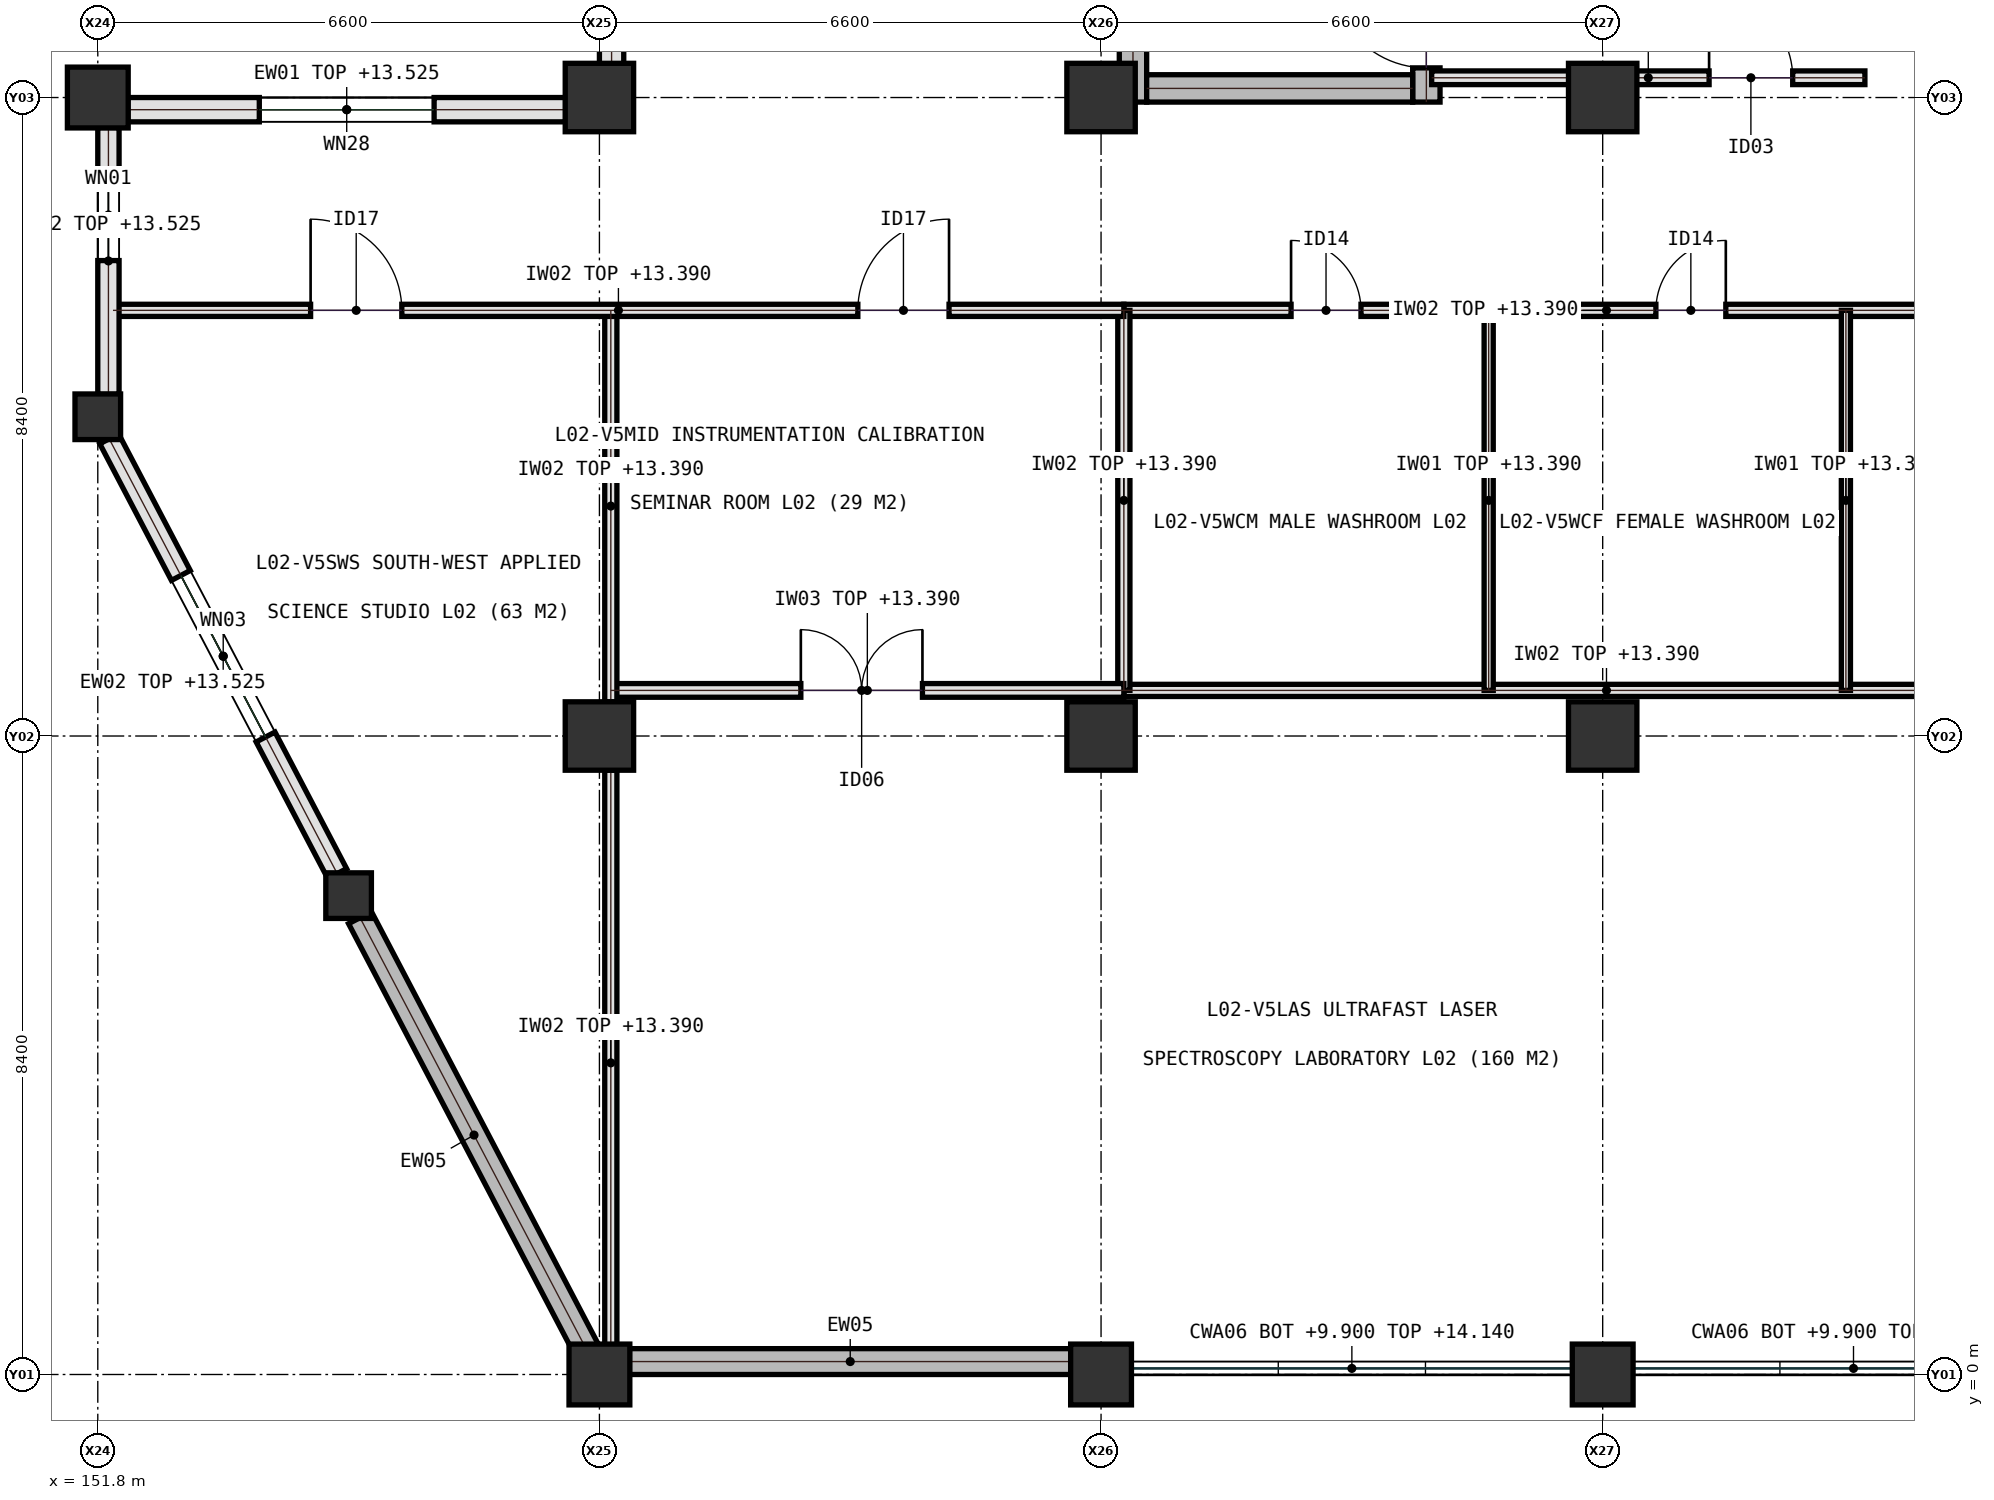
"""IFC4 building model, lengths in metres.
Left out: names, types, materials, properties, quantities, classifications, styles, units other than length and angle.
Written with IfcOpenShell. Run it as: python <this file> out.ifc"""

import sys

from ifc_helpers import new_model, si_unit, direction, frame, frame_2d, origin, origin_2d, place, context, subcontext, project, spatial, rectangle, extrude, element, fill, save


model = new_model("IFC4")
c1 = context("Model", 3, precision=1e-05, world=origin(), true_north=direction((0.0, 1.0)))
c2 = subcontext(c1, "Body", "Model", "MODEL_VIEW")
j1 = project(units=[si_unit("LENGTHUNIT", "METRE"), si_unit("PLANEANGLEUNIT", "RADIAN")], contexts=[c1])
p1 = place(None, origin())
s1 = spatial("IfcSite", under=j1, at=p1, CompositionType="ELEMENT")
p2 = place(p1, origin())
s2 = spatial("IfcBuilding", under=s1, at=p2, CompositionType="ELEMENT")
p3 = place(p2, frame((0.0, 0.0, 9.9)))
s3 = spatial("IfcBuildingStorey", under=s2, at=p3, CompositionType="ELEMENT", Elevation=9.9)
for number, where, z_axis, x_axis in (
    (1, (151.8, 16.8, 0.0), (0.0, 0.0, 1.0), (1.0, 0.0, 0.0)),
    (2, (158.4, 0.0, 0.0), (0.0, 0.0, 1.0), (1.0, 0.0, 0.0)),
):
    element("IfcColumn", number, at=place(p3, frame(where, z_axis=z_axis, x_axis=x_axis)), inside=s3, PredefinedType="COLUMN", context=c2, shape_type="SweptSolid", body=[
        extrude(rectangle(XDim=0.8, YDim=0.8, at=origin_2d()), origin(), (0.0, 0.0, 1.0), 4.5),
    ])
for number, where, z_axis, x_axis in (
    (3, (158.4, 8.4, 0.0), (0.0, 0.0, 1.0), (1.0, 0.0, 0.0)),
    (4, (158.4, 16.8, 0.0), (0.0, 0.0, 1.0), (1.0, 0.0, 0.0)),
):
    element("IfcColumn", number, at=place(p3, frame(where, z_axis=z_axis, x_axis=x_axis)), inside=s3, PredefinedType="COLUMN", context=c2, shape_type="SweptSolid", body=[
        extrude(rectangle(XDim=0.9, YDim=0.9, at=origin_2d()), origin(), (0.0, 0.0, 1.0), 4.5),
    ])
p4 = place(p3, frame((165.0, 0.0, 0.0), z_axis=(0.0, 0.0, 1.0), x_axis=(1.0, 0.0, 0.0)))
e5 = element("IfcColumn", 5, at=p4, inside=s3, PredefinedType="COLUMN", context=c2, shape_type="SweptSolid", body=[
    extrude(rectangle(XDim=0.8, YDim=0.8, at=origin_2d()), origin(), (0.0, 0.0, 1.0), 4.5),
])
for number, where, z_axis, x_axis in (
    (6, (165.0, 8.4, 0.0), (0.0, 0.0, 1.0), (1.0, 0.0, 0.0)),
    (7, (165.0, 16.8, 0.0), (0.0, 0.0, 1.0), (1.0, 0.0, 0.0)),
):
    element("IfcColumn", number, at=place(p3, frame(where, z_axis=z_axis, x_axis=x_axis)), inside=s3, PredefinedType="COLUMN", context=c2, shape_type="SweptSolid", body=[
        extrude(rectangle(XDim=0.9, YDim=0.9, at=origin_2d()), origin(), (0.0, 0.0, 1.0), 4.5),
    ])
p5 = place(p3, frame((171.6, 0.0, 0.0), z_axis=(0.0, 0.0, 1.0), x_axis=(1.0, 0.0, 0.0)))
e8 = element("IfcColumn", 8, at=p5, inside=s3, PredefinedType="COLUMN", context=c2, shape_type="SweptSolid", body=[
    extrude(rectangle(XDim=0.8, YDim=0.8, at=origin_2d()), origin(), (0.0, 0.0, 1.0), 4.5),
])
for number, where, z_axis, x_axis in (
    (9, (171.6, 8.4, 0.0), (0.0, 0.0, 1.0), (1.0, 0.0, 0.0)),
    (10, (171.6, 16.8, 0.0), (0.0, 0.0, 1.0), (1.0, 0.0, 0.0)),
):
    element("IfcColumn", number, at=place(p3, frame(where, z_axis=z_axis, x_axis=x_axis)), inside=s3, PredefinedType="COLUMN", context=c2, shape_type="SweptSolid", body=[
        extrude(rectangle(XDim=0.9, YDim=0.9, at=origin_2d()), origin(), (0.0, 0.0, 1.0), 4.5),
    ])
for number, where, z_axis, x_axis in (
    (11, (151.8, 12.6, 0.0), (0.0, 0.0, 1.0), (1.0, 0.0, 0.0)),
    (12, (155.1, 6.3, 0.0), (0.0, 0.0, 1.0), (1.0, 0.0, 0.0)),
):
    element("IfcColumn", number, at=place(p3, frame(where, z_axis=z_axis, x_axis=x_axis)), inside=s3, PredefinedType="COLUMN", context=c2, shape_type="SweptSolid", body=[
        extrude(rectangle(XDim=0.6, YDim=0.6, at=origin_2d()), origin(), (0.0, 0.0, 1.0), 4.5),
    ])
p6 = place(p3, frame((165.3, 14.0, 0.0), z_axis=(0.0, 0.0, 1.0), x_axis=(1.0, 0.0, 0.0)))
e13 = element("IfcWall", 13, at=p6, inside=s3, PredefinedType="PARTITIONING", context=c2, shape_type="SweptSolid", body=[
    extrude(rectangle(XDim=12.7, YDim=0.16, at=frame_2d((6.35, 0.0))), origin(), (0.0, 0.0, 1.0), 3.49),
])
p7 = place(p6, frame((2.2, 0.0, 0.0)))
e14 = element("IfcOpeningElement", 14, at=p7, cuts=e13, PredefinedType="OPENING", context=c2, shape_type="SweptSolid", body=[
    extrude(rectangle(XDim=0.92, YDim=2.08, at=frame_2d((0.46, 1.04))), frame((0.0, 0.09, 0.0), z_axis=(0.0, -1.0, 0.0), x_axis=(1.0, 0.0, 0.0)), (0.0, 0.0, 1.0), 0.18),
])
p8 = place(p6, frame((7.0, 0.0, 0.0)))
e15 = element("IfcOpeningElement", 15, at=p8, cuts=e13, PredefinedType="OPENING", context=c2, shape_type="SweptSolid", body=[
    extrude(rectangle(XDim=0.92, YDim=2.08, at=frame_2d((0.46, 1.04))), frame((0.0, 0.09, 0.0), z_axis=(0.0, -1.0, 0.0), x_axis=(1.0, 0.0, 0.0)), (0.0, 0.0, 1.0), 0.18),
])
p9 = place(p6, frame((11.0, 0.0, 0.0)))
e16 = element("IfcOpeningElement", 16, at=p9, cuts=e13, PredefinedType="OPENING", context=c2, shape_type="SweptSolid", body=[
    extrude(rectangle(XDim=0.92, YDim=2.08, at=frame_2d((0.46, 1.04))), frame((0.0, 0.09, 0.0), z_axis=(0.0, -1.0, 0.0), x_axis=(1.0, 0.0, 0.0)), (0.0, 0.0, 1.0), 0.18),
])
p10 = place(p3, frame((165.3, 9.0, 0.0), z_axis=(0.0, 0.0, 1.0), x_axis=(1.0, 0.0, 0.0)))
e17 = element("IfcWall", 17, at=p10, inside=s3, PredefinedType="PARTITIONING", context=c2, shape_type="SweptSolid", body=[
    extrude(rectangle(XDim=12.7, YDim=0.16, at=frame_2d((6.35, 0.0))), origin(), (0.0, 0.0, 1.0), 3.49),
])
p11 = place(p3, frame((165.3, 9.0, 0.0), z_axis=(0.0, 0.0, 1.0), x_axis=(0.0, 1.0, 0.0)))
e18 = element("IfcWall", 18, at=p11, inside=s3, PredefinedType="PARTITIONING", context=c2, shape_type="SweptSolid", body=[
    extrude(rectangle(XDim=5.0, YDim=0.16, at=frame_2d((2.5, 0.0))), origin(), (0.0, 0.0, 1.0), 3.49),
])
for number, where, z_axis, x_axis in (
    (19, (170.1, 9.0, 0.0), (0.0, 0.0, 1.0), (0.0, 1.0, 0.0)),
    (20, (174.8, 9.0, 0.0), (0.0, 0.0, 1.0), (0.0, 1.0, 0.0)),
):
    element("IfcWall", number, at=place(p3, frame(where, z_axis=z_axis, x_axis=x_axis)), inside=s3, PredefinedType="PARTITIONING", context=c2, shape_type="SweptSolid", body=[
        extrude(rectangle(XDim=5.0, YDim=0.12, at=frame_2d((2.5, 0.0))), origin(), (0.0, 0.0, 1.0), 3.49),
    ])
p12 = place(p3, frame((158.55, 9.0, 0.0), z_axis=(0.0, 0.0, 1.0), x_axis=(1.0, 0.0, 0.0)))
e21 = element("IfcWall", 21, at=p12, inside=s3, PredefinedType="SOLIDWALL", context=c2, shape_type="SweptSolid", body=[
    extrude(rectangle(XDim=6.75, YDim=0.18, at=frame_2d((3.375, 0.0))), origin(), (0.0, 0.0, 1.0), 3.49),
])
p13 = place(p12, frame((2.5, 0.0, 0.0)))
e22 = element("IfcOpeningElement", 22, at=p13, cuts=e21, PredefinedType="OPENING", context=c2, shape_type="SweptSolid", body=[
    extrude(rectangle(XDim=1.6, YDim=2.2, at=frame_2d((0.8, 1.1))), frame((0.0, 0.1, 0.0), z_axis=(0.0, -1.0, 0.0), x_axis=(1.0, 0.0, 0.0)), (0.0, 0.0, 1.0), 0.2),
])
p14 = place(p3, frame((158.55, 0.25, 0.0), z_axis=(0.0, 0.0, 1.0), x_axis=(0.0, 1.0, 0.0)))
e23 = element("IfcWall", 23, at=p14, inside=s3, PredefinedType="PARTITIONING", context=c2, shape_type="SweptSolid", body=[
    extrude(rectangle(XDim=7.7, YDim=0.16, at=frame_2d((3.85, 0.0))), origin(), (0.0, 0.0, 1.0), 3.49),
])
p15 = place(p3, frame((158.55, 8.85, 0.0), z_axis=(0.0, 0.0, 1.0), x_axis=(0.0, 1.0, 0.0)))
e24 = element("IfcWall", 24, at=p15, inside=s3, PredefinedType="PARTITIONING", context=c2, shape_type="SweptSolid", body=[
    extrude(rectangle(XDim=5.15, YDim=0.16, at=frame_2d((2.575, 0.0))), origin(), (0.0, 0.0, 1.0), 3.49),
])
p16 = place(p3, frame((152.0, 14.0, 0.0), z_axis=(0.0, 0.0, 1.0), x_axis=(1.0, 0.0, 0.0)))
e25 = element("IfcWall", 25, at=p16, inside=s3, PredefinedType="PARTITIONING", context=c2, shape_type="SweptSolid", body=[
    extrude(rectangle(XDim=13.3, YDim=0.16, at=frame_2d((6.65, 0.0))), origin(), (0.0, 0.0, 1.0), 3.49),
])
p17 = place(p16, frame((2.6, 0.0, 0.0)))
e26 = element("IfcOpeningElement", 26, at=p17, cuts=e25, PredefinedType="OPENING", context=c2, shape_type="SweptSolid", body=[
    extrude(rectangle(XDim=1.2, YDim=2.22, at=frame_2d((0.6, 1.11))), frame((0.0, 0.09, 0.0), z_axis=(0.0, -1.0, 0.0), x_axis=(1.0, 0.0, 0.0)), (0.0, 0.0, 1.0), 0.18),
])
p18 = place(p16, frame((9.8, 0.0, 0.0)))
e27 = element("IfcOpeningElement", 27, at=p18, cuts=e25, PredefinedType="OPENING", context=c2, shape_type="SweptSolid", body=[
    extrude(rectangle(XDim=1.2, YDim=2.22, at=frame_2d((0.6, 1.11))), frame((0.0, 0.09, 0.0), z_axis=(0.0, -1.0, 0.0), x_axis=(1.0, 0.0, 0.0)), (0.0, 0.0, 1.0), 0.18),
])
p19 = place(p3, frame((157.955, 16.64, 0.0), z_axis=(0.0, 0.0, 1.0), x_axis=(-1.0, 0.0, 0.0)))
e28 = element("IfcWall", 28, at=p19, inside=s3, PredefinedType="SOLIDWALL", context=c2, shape_type="SweptSolid", body=[
    extrude(rectangle(XDim=5.76, YDim=0.32, at=frame_2d((2.88, 0.0))), origin(), (0.0, 0.0, 1.0), 3.625),
])
p20 = place(p19, frame((1.73, 0.0, 0.95)))
e29 = element("IfcOpeningElement", 29, at=p20, cuts=e28, PredefinedType="OPENING", context=c2, shape_type="SweptSolid", body=[
    extrude(rectangle(XDim=2.3, YDim=1.95, at=frame_2d((1.15, 0.975))), frame((0.0, 0.17, 0.0), z_axis=(0.0, -1.0, 0.0), x_axis=(1.0, 0.0, 0.0)), (0.0, 0.0, 1.0), 0.34),
])
p21 = place(p3, frame((158.795, 0.17, 0.0), z_axis=(0.0, 0.0, 1.0), x_axis=(1.0, 0.0, 0.0)))
e30 = element("IfcWall", 30, at=p21, inside=s3, PredefinedType="SHEAR", context=c2, shape_type="SweptSolid", body=[
    extrude(rectangle(XDim=5.81, YDim=0.34, at=frame_2d((2.905, 0.0))), origin(), (0.0, 0.0, 1.0), 4.24),
])
p22 = place(p3, frame((158.56, 24.755, 0.0), z_axis=(0.0, 0.0, 1.0), x_axis=(0.0, -1.0, 0.0)))
e31 = element("IfcWall", 31, at=p22, inside=s3, PredefinedType="SOLIDWALL", context=c2, shape_type="SweptSolid", body=[
    extrude(rectangle(XDim=7.51, YDim=0.32, at=frame_2d((3.755, 0.0))), origin(), (0.0, 0.0, 1.0), 3.625),
])
p23 = place(p22, frame((2.655, 0.0, 0.95)))
e32 = element("IfcOpeningElement", 32, at=p23, cuts=e31, PredefinedType="OPENING", context=c2, shape_type="SweptSolid", body=[
    extrude(rectangle(XDim=2.2, YDim=1.85, at=frame_2d((1.1, 0.925))), frame((0.0, 0.17, 0.0), z_axis=(0.0, -1.0, 0.0), x_axis=(1.0, 0.0, 0.0)), (0.0, 0.0, 1.0), 0.34),
])
p24 = place(p3, frame((151.94, 16.405, 0.0), z_axis=(0.0, 0.0, 1.0), x_axis=(0.0, -1.0, 0.0)))
e33 = element("IfcWall", 33, at=p24, inside=s3, PredefinedType="SOLIDWALL", context=c2, shape_type="SweptSolid", body=[
    extrude(rectangle(XDim=3.51, YDim=0.28, at=frame_2d((1.755, 0.0))), origin(), (0.0, 0.0, 1.0), 3.625),
])
p25 = place(p24, frame((0.55, 0.0, 0.95)))
e34 = element("IfcOpeningElement", 34, at=p25, cuts=e33, PredefinedType="OPENING", context=c2, shape_type="SweptSolid", body=[
    extrude(rectangle(XDim=1.2, YDim=1.5, at=frame_2d((0.6, 0.75))), frame((0.0, 0.15, 0.0), z_axis=(0.0, -1.0, 0.0), x_axis=(1.0, 0.0, 0.0)), (0.0, 0.0, 1.0), 0.3),
])
p26 = place(p3, frame((151.95, 12.31, 0.0), z_axis=(0.0, 0.0, 1.0), x_axis=(0.464471613901, -0.885588007981, 0.0)))
e35 = element("IfcWall", 35, at=p26, inside=s3, PredefinedType="SOLIDWALL", context=c2, shape_type="SweptSolid", body=[
    extrude(rectangle(XDim=6.459, YDim=0.28, at=frame_2d((3.229, 0.0))), origin(), (0.0, 0.0, 1.0), 3.625),
])
p27 = place(p26, frame((2.03, 0.0, 0.95)))
e36 = element("IfcOpeningElement", 36, at=p27, cuts=e35, PredefinedType="OPENING", context=c2, shape_type="SweptSolid", body=[
    extrude(rectangle(XDim=2.4, YDim=1.6, at=frame_2d((1.2, 0.8))), frame((0.0, 0.15, 0.0), z_axis=(0.0, -1.0, 0.0), x_axis=(1.0, 0.0, 0.0)), (0.0, 0.0, 1.0), 0.3),
])
p28 = place(p3, frame((155.25, 6.01, 0.0), z_axis=(0.0, 0.0, 1.0), x_axis=(0.464471613901, -0.885588007981, 0.0)))
e37 = element("IfcWall", 37, at=p28, inside=s3, PredefinedType="SHEAR", context=c2, shape_type="SweptSolid", body=[
    extrude(rectangle(XDim=6.459, YDim=0.34, at=frame_2d((3.229, 0.0))), origin(), (0.0, 0.0, 1.0), 4.24),
])
p29 = place(p3, frame((165.42, 16.74, 0.0), z_axis=(0.0, 0.0, 1.0), x_axis=(0.0, 1.0, 0.0)))
e38 = element("IfcWall", 38, at=p29, inside=s3, PredefinedType="SHEAR", context=c2, shape_type="SweptSolid", body=[
    extrude(rectangle(XDim=8.37, YDim=0.36, at=frame_2d((4.185, 0.0))), origin(), (0.0, 0.0, 1.0), 4.24),
])
p30 = place(p3, frame((169.28, 16.74, 0.0), z_axis=(0.0, 0.0, 1.0), x_axis=(0.0, 1.0, 0.0)))
e39 = element("IfcWall", 39, at=p30, inside=s3, PredefinedType="SHEAR", context=c2, shape_type="SweptSolid", body=[
    extrude(rectangle(XDim=8.37, YDim=0.36, at=frame_2d((4.185, 0.0))), origin(), (0.0, 0.0, 1.0), 4.24),
])
p31 = place(p30, frame((0.45, 0.0, 0.0)))
e40 = element("IfcOpeningElement", 40, at=p31, cuts=e39, PredefinedType="OPENING", context=c2, shape_type="SweptSolid", body=[
    extrude(rectangle(XDim=1.25, YDim=2.15, at=frame_2d((0.625, 1.075))), frame((0.0, 0.19, 0.0), z_axis=(0.0, -1.0, 0.0), x_axis=(1.0, 0.0, 0.0)), (0.0, 0.0, 1.0), 0.38),
])
p32 = place(p3, frame((165.6, 16.92, 0.0), z_axis=(0.0, 0.0, 1.0), x_axis=(1.0, 0.0, 0.0)))
e41 = element("IfcWall", 41, at=p32, inside=s3, PredefinedType="SHEAR", context=c2, shape_type="SweptSolid", body=[
    extrude(rectangle(XDim=3.5, YDim=0.36, at=frame_2d((1.75, 0.0))), origin(), (0.0, 0.0, 1.0), 4.24),
])
p33 = place(p3, frame((169.35, 17.06, 0.0), z_axis=(0.0, 0.0, 1.0), x_axis=(1.0, 0.0, 0.0)))
e42 = element("IfcWall", 42, at=p33, inside=s3, PredefinedType="SOLIDWALL", context=c2, shape_type="SweptSolid", body=[
    extrude(rectangle(XDim=5.7, YDim=0.18, at=frame_2d((2.85, 0.0))), origin(), (0.0, 0.0, 1.0), 3.575),
])
p34 = place(p33, frame((3.65, 0.0, 0.0)))
e43 = element("IfcOpeningElement", 43, at=p34, cuts=e42, PredefinedType="OPENING", context=c2, shape_type="SweptSolid", body=[
    extrude(rectangle(XDim=1.1, YDim=2.15, at=frame_2d((0.55, 1.075))), frame((0.0, 0.1, 0.0), z_axis=(0.0, -1.0, 0.0), x_axis=(1.0, 0.0, 0.0)), (0.0, 0.0, 1.0), 0.2),
])
p35 = place(p7, origin())
e44 = element("IfcDoor", 44, at=p35, inside=s3, OperationType="SINGLE_SWING_LEFT", PredefinedType="DOOR", context=c2, shape_type="SweptSolid", body=[
    extrude(rectangle(XDim=0.92, YDim=2.08, at=frame_2d((0.46, 1.04))), frame((0.0, 0.025, 0.0), z_axis=(0.0, -1.0, 0.0), x_axis=(1.0, 0.0, 0.0)), (0.0, 0.0, 1.0), 0.05),
])
fill(e14, e44)
p36 = place(p8, origin())
e45 = element("IfcDoor", 45, at=p36, inside=s3, OperationType="SINGLE_SWING_RIGHT", PredefinedType="DOOR", context=c2, shape_type="SweptSolid", body=[
    extrude(rectangle(XDim=0.92, YDim=2.08, at=frame_2d((0.46, 1.04))), frame((0.0, 0.025, 0.0), z_axis=(0.0, -1.0, 0.0), x_axis=(1.0, 0.0, 0.0)), (0.0, 0.0, 1.0), 0.05),
])
fill(e15, e45)
p37 = place(p13, origin())
e46 = element("IfcDoor", 46, at=p37, inside=s3, OperationType="DOUBLE_DOOR_SINGLE_SWING", PredefinedType="DOOR", context=c2, shape_type="SweptSolid", body=[
    extrude(rectangle(XDim=1.6, YDim=2.2, at=frame_2d((0.8, 1.1))), frame((0.0, 0.025, 0.0), z_axis=(0.0, -1.0, 0.0), x_axis=(1.0, 0.0, 0.0)), (0.0, 0.0, 1.0), 0.05),
])
fill(e22, e46)
p38 = place(p17, origin())
e47 = element("IfcDoor", 47, at=p38, inside=s3, OperationType="SINGLE_SWING_LEFT", PredefinedType="DOOR", context=c2, shape_type="SweptSolid", body=[
    extrude(rectangle(XDim=1.2, YDim=2.22, at=frame_2d((0.6, 1.11))), frame((0.0, 0.025, 0.0), z_axis=(0.0, -1.0, 0.0), x_axis=(1.0, 0.0, 0.0)), (0.0, 0.0, 1.0), 0.05),
])
fill(e26, e47)
p39 = place(p18, origin())
e48 = element("IfcDoor", 48, at=p39, inside=s3, OperationType="SINGLE_SWING_RIGHT", PredefinedType="DOOR", context=c2, shape_type="SweptSolid", body=[
    extrude(rectangle(XDim=1.2, YDim=2.22, at=frame_2d((0.6, 1.11))), frame((0.0, 0.025, 0.0), z_axis=(0.0, -1.0, 0.0), x_axis=(1.0, 0.0, 0.0)), (0.0, 0.0, 1.0), 0.05),
])
fill(e27, e48)
p40 = place(p20, origin())
e49 = element("IfcWindow", 49, at=p40, inside=s3, PartitioningType="SINGLE_PANEL", PredefinedType="WINDOW", context=c2, shape_type="SweptSolid", body=[
    extrude(rectangle(XDim=2.3, YDim=1.95, at=frame_2d((1.15, 0.975))), frame((0.0, 0.03, 0.0), z_axis=(0.0, -1.0, 0.0), x_axis=(1.0, 0.0, 0.0)), (0.0, 0.0, 1.0), 0.06),
])
fill(e29, e49)
p41 = place(p25, origin())
e50 = element("IfcWindow", 50, at=p41, inside=s3, PartitioningType="SINGLE_PANEL", PredefinedType="WINDOW", context=c2, shape_type="SweptSolid", body=[
    extrude(rectangle(XDim=1.2, YDim=1.5, at=frame_2d((0.6, 0.75))), frame((0.0, 0.03, 0.0), z_axis=(0.0, -1.0, 0.0), x_axis=(1.0, 0.0, 0.0)), (0.0, 0.0, 1.0), 0.06),
])
fill(e34, e50)
p42 = place(p27, origin())
e51 = element("IfcWindow", 51, at=p42, inside=s3, PartitioningType="SINGLE_PANEL", PredefinedType="WINDOW", context=c2, shape_type="SweptSolid", body=[
    extrude(rectangle(XDim=2.4, YDim=1.6, at=frame_2d((1.2, 0.8))), frame((0.0, 0.03, 0.0), z_axis=(0.0, -1.0, 0.0), x_axis=(1.0, 0.0, 0.0)), (0.0, 0.0, 1.0), 0.06),
])
fill(e36, e51)
p43 = place(p31, origin())
e52 = element("IfcDoor", 52, at=p43, inside=s3, OperationType="SINGLE_SWING_RIGHT", PredefinedType="DOOR", context=c2, shape_type="SweptSolid", body=[
    extrude(rectangle(XDim=1.25, YDim=2.15, at=frame_2d((0.625, 1.075))), frame((0.0, 0.025, 0.0), z_axis=(0.0, -1.0, 0.0), x_axis=(1.0, 0.0, 0.0)), (0.0, 0.0, 1.0), 0.05),
])
fill(e40, e52)
p44 = place(p34, origin())
e53 = element("IfcDoor", 53, at=p44, inside=s3, OperationType="SINGLE_SWING_LEFT", PredefinedType="DOOR", context=c2, shape_type="SweptSolid", body=[
    extrude(rectangle(XDim=1.1, YDim=2.15, at=frame_2d((0.55, 1.075))), frame((0.0, 0.025, 0.0), z_axis=(0.0, -1.0, 0.0), x_axis=(1.0, 0.0, 0.0)), (0.0, 0.0, 1.0), 0.05),
])
fill(e43, e53)
save(model, sys.argv[1])
